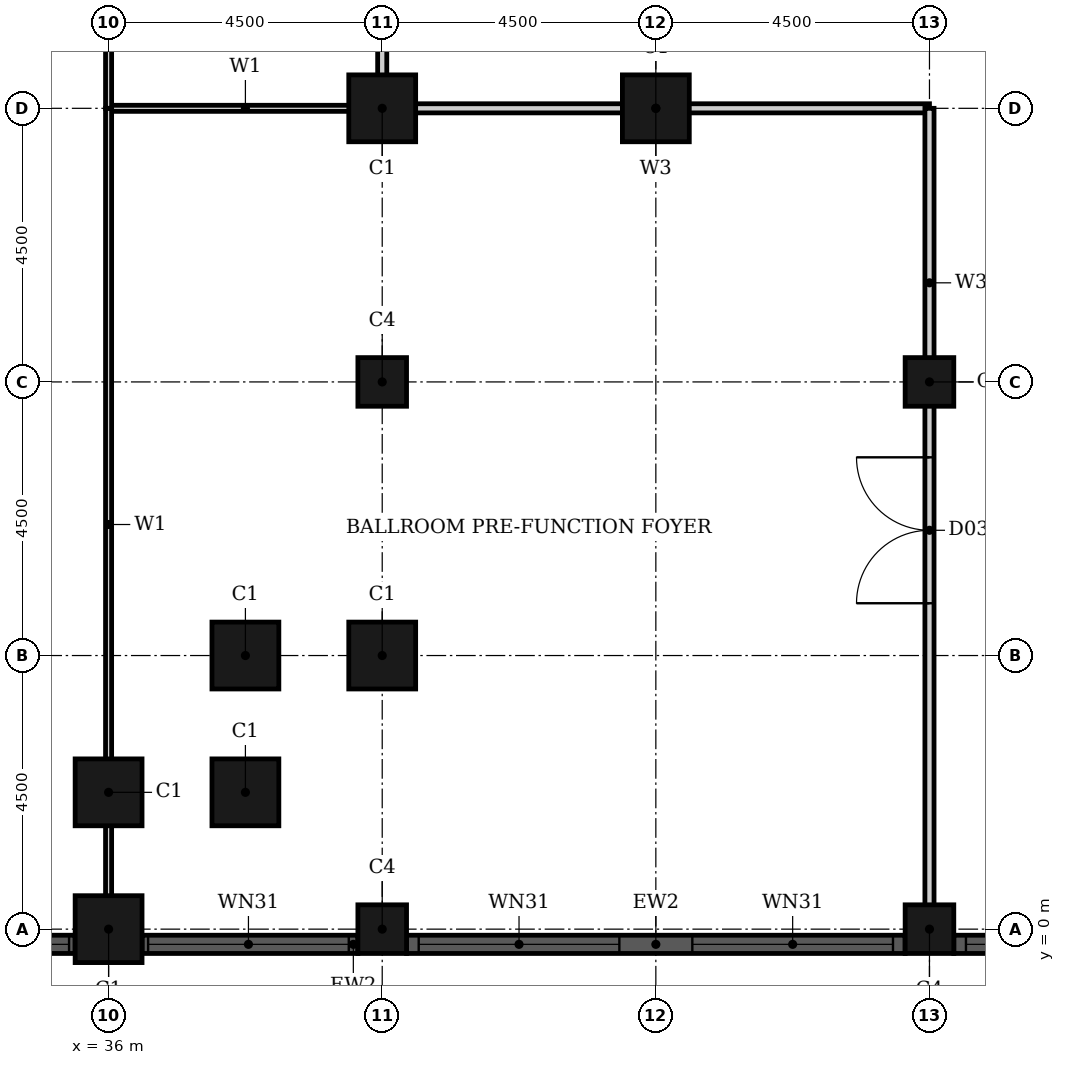
"""IFC4 building model, lengths in metres.
Left out: names, types, materials, properties, quantities, classifications, styles, units other than length and angle.
Written with IfcOpenShell. Run it as: python <this file> out.ifc"""

import sys

from ifc_helpers import new_model, si_unit, direction, frame, frame_2d, origin, origin_2d, place, context, subcontext, project, spatial, rectangle, hollow_rectangle, extrude, element, fill, save


model = new_model("IFC4")
c1 = context("Model", 3, precision=1e-05, world=origin(), true_north=direction((0.0, 1.0)))
c2 = subcontext(c1, "Body", "Model", "MODEL_VIEW")
j1 = project(units=[si_unit("LENGTHUNIT", "METRE"), si_unit("PLANEANGLEUNIT", "RADIAN")], contexts=[c1])
p1 = place(None, origin())
s1 = spatial("IfcSite", under=j1, at=p1, CompositionType="ELEMENT")
p2 = place(p1, origin())
s2 = spatial("IfcBuilding", under=s1, at=p2, CompositionType="ELEMENT")
p3 = place(p2, frame((0.0, 0.0, 17.4)))
s3 = spatial("IfcBuildingStorey", under=s2, at=p3, CompositionType="ELEMENT", Elevation=17.4)
for number, where, z_axis, x_axis in (
    (1, (36.0, 0.0, 0.0), (0.0, 0.0, 1.0), (1.0, 0.0, 0.0)),
    (2, (36.0, 2.25, 0.0), (0.0, 0.0, 1.0), (1.0, 0.0, 0.0)),
    (3, (38.25, 2.25, 0.0), (0.0, 0.0, 1.0), (1.0, 0.0, 0.0)),
    (4, (38.25, 4.5, 0.0), (0.0, 0.0, 1.0), (1.0, 0.0, 0.0)),
    (5, (40.5, 4.5, 0.0), (0.0, 0.0, 1.0), (1.0, 0.0, 0.0)),
    (6, (40.5, 13.5, 0.0), (0.0, 0.0, 1.0), (1.0, 0.0, 0.0)),
    (7, (45.0, 13.5, 0.0), (0.0, 0.0, 1.0), (1.0, 0.0, 0.0)),
):
    element("IfcColumn", number, at=place(p3, frame(where, z_axis=z_axis, x_axis=x_axis)), inside=s3, PredefinedType="COLUMN", context=c2, shape_type="SweptSolid", body=[
        extrude(hollow_rectangle(XDim=1.1, YDim=1.1, WallThickness=0.036, at=origin_2d()), origin(), (0.0, 0.0, 1.0), 6.6),
    ])
for number, where, z_axis, x_axis in (
    (8, (40.5, 0.0, 0.0), (0.0, 0.0, 1.0), (1.0, 0.0, 0.0)),
    (9, (49.5, 0.0, 0.0), (0.0, 0.0, 1.0), (1.0, 0.0, 0.0)),
    (10, (40.5, 9.0, 0.0), (0.0, 0.0, 1.0), (1.0, 0.0, 0.0)),
    (11, (49.5, 9.0, 0.0), (0.0, 0.0, 1.0), (1.0, 0.0, 0.0)),
):
    element("IfcColumn", number, at=place(p3, frame(where, z_axis=z_axis, x_axis=x_axis)), inside=s3, PredefinedType="COLUMN", context=c2, shape_type="SweptSolid", body=[
        extrude(hollow_rectangle(XDim=0.8, YDim=0.8, WallThickness=0.025, at=origin_2d()), origin(), (0.0, 0.0, 1.0), 6.6),
    ])
p4 = place(p3, frame((31.9, -0.25, 0.0), z_axis=(0.0, 0.0, 1.0), x_axis=(1.0, 0.0, 0.0)))
e12 = element("IfcWall", 12, at=p4, inside=s3, PredefinedType="SOLIDWALL", context=c2, shape_type="SweptSolid", body=[
    extrude(rectangle(XDim=3.55, YDim=0.3, at=frame_2d((1.775, 0.0))), origin(), (0.0, 0.0, 1.0), 6.6),
])
p5 = place(p4, frame((0.15, 0.0, 0.9)))
e13 = element("IfcOpeningElement", 13, at=p5, cuts=e12, PredefinedType="OPENING", context=c2, shape_type="SweptSolid", body=[
    extrude(rectangle(XDim=3.3, YDim=3.6, at=frame_2d((1.65, 1.8))), frame((0.0, 0.16, 0.0), z_axis=(0.0, -1.0, 0.0), x_axis=(1.0, 0.0, 0.0)), (0.0, 0.0, 1.0), 0.32),
])
p6 = place(p3, frame((36.55, -0.25, 0.0), z_axis=(0.0, 0.0, 1.0), x_axis=(1.0, 0.0, 0.0)))
e14 = element("IfcWall", 14, at=p6, inside=s3, PredefinedType="SOLIDWALL", context=c2, shape_type="SweptSolid", body=[
    extrude(rectangle(XDim=3.55, YDim=0.3, at=frame_2d((1.775, 0.0))), origin(), (0.0, 0.0, 1.0), 6.6),
])
p7 = place(p6, frame((0.1, 0.0, 0.9)))
e15 = element("IfcOpeningElement", 15, at=p7, cuts=e14, PredefinedType="OPENING", context=c2, shape_type="SweptSolid", body=[
    extrude(rectangle(XDim=3.3, YDim=3.6, at=frame_2d((1.65, 1.8))), frame((0.0, 0.16, 0.0), z_axis=(0.0, -1.0, 0.0), x_axis=(1.0, 0.0, 0.0)), (0.0, 0.0, 1.0), 0.32),
])
p8 = place(p3, frame((40.9, -0.25, 0.0), z_axis=(0.0, 0.0, 1.0), x_axis=(1.0, 0.0, 0.0)))
e16 = element("IfcWall", 16, at=p8, inside=s3, PredefinedType="SOLIDWALL", context=c2, shape_type="SweptSolid", body=[
    extrude(rectangle(XDim=8.2, YDim=0.3, at=frame_2d((4.1, 0.0))), origin(), (0.0, 0.0, 1.0), 6.6),
])
p9 = place(p8, frame((0.2, 0.0, 0.9)))
e17 = element("IfcOpeningElement", 17, at=p9, cuts=e16, PredefinedType="OPENING", context=c2, shape_type="SweptSolid", body=[
    extrude(rectangle(XDim=3.3, YDim=3.6, at=frame_2d((1.65, 1.8))), frame((0.0, 0.16, 0.0), z_axis=(0.0, -1.0, 0.0), x_axis=(1.0, 0.0, 0.0)), (0.0, 0.0, 1.0), 0.32),
])
p10 = place(p8, frame((4.7, 0.0, 0.9)))
e18 = element("IfcOpeningElement", 18, at=p10, cuts=e16, PredefinedType="OPENING", context=c2, shape_type="SweptSolid", body=[
    extrude(rectangle(XDim=3.3, YDim=3.6, at=frame_2d((1.65, 1.8))), frame((0.0, 0.16, 0.0), z_axis=(0.0, -1.0, 0.0), x_axis=(1.0, 0.0, 0.0)), (0.0, 0.0, 1.0), 0.32),
])
p11 = place(p3, frame((49.9, -0.25, 0.0), z_axis=(0.0, 0.0, 1.0), x_axis=(1.0, 0.0, 0.0)))
e19 = element("IfcWall", 19, at=p11, inside=s3, PredefinedType="SOLIDWALL", context=c2, shape_type="SweptSolid", body=[
    extrude(rectangle(XDim=8.2, YDim=0.3, at=frame_2d((4.1, 0.0))), origin(), (0.0, 0.0, 1.0), 6.6),
])
p12 = place(p11, frame((0.2, 0.0, 0.9)))
e20 = element("IfcOpeningElement", 20, at=p12, cuts=e19, PredefinedType="OPENING", context=c2, shape_type="SweptSolid", body=[
    extrude(rectangle(XDim=3.3, YDim=3.6, at=frame_2d((1.65, 1.8))), frame((0.0, 0.16, 0.0), z_axis=(0.0, -1.0, 0.0), x_axis=(1.0, 0.0, 0.0)), (0.0, 0.0, 1.0), 0.32),
])
p13 = place(p11, frame((4.7, 0.0, 0.9)))
e21 = element("IfcOpeningElement", 21, at=p13, cuts=e19, PredefinedType="OPENING", context=c2, shape_type="SweptSolid", body=[
    extrude(rectangle(XDim=3.3, YDim=3.6, at=frame_2d((1.65, 1.8))), frame((0.0, 0.16, 0.0), z_axis=(0.0, -1.0, 0.0), x_axis=(1.0, 0.0, 0.0)), (0.0, 0.0, 1.0), 0.32),
])
p14 = place(p3, frame((40.5, 13.5, 0.0), z_axis=(0.0, 0.0, 1.0), x_axis=(1.0, 0.0, 0.0)))
e22 = element("IfcWall", 22, at=p14, inside=s3, PredefinedType="PARTITIONING", context=c2, shape_type="SweptSolid", body=[
    extrude(rectangle(XDim=9.0, YDim=0.15, at=frame_2d((4.5, 0.0))), origin(), (0.0, 0.0, 1.0), 6.25),
])
p15 = place(p3, frame((40.5, 13.5, 0.0), z_axis=(0.0, 0.0, 1.0), x_axis=(0.0, 1.0, 0.0)))
e23 = element("IfcWall", 23, at=p15, inside=s3, PredefinedType="PARTITIONING", context=c2, shape_type="SweptSolid", body=[
    extrude(rectangle(XDim=9.0, YDim=0.15, at=frame_2d((4.5, 0.0))), origin(), (0.0, 0.0, 1.0), 6.25),
])
p16 = place(p15, frame((5.35, 0.0, 0.0)))
e24 = element("IfcOpeningElement", 24, at=p16, cuts=e23, PredefinedType="OPENING", context=c2, shape_type="SweptSolid", body=[
    extrude(rectangle(XDim=1.0, YDim=2.1, at=frame_2d((0.5, 1.05))), frame((0.0, 0.085, 0.0), z_axis=(0.0, -1.0, 0.0), x_axis=(1.0, 0.0, 0.0)), (0.0, 0.0, 1.0), 0.17),
])
p17 = place(p3, frame((49.5, -0.19, 0.0), z_axis=(0.0, 0.0, 1.0), x_axis=(0.0, 1.0, 0.0)))
e25 = element("IfcWall", 25, at=p17, inside=s3, PredefinedType="PARTITIONING", context=c2, shape_type="SweptSolid", body=[
    extrude(rectangle(XDim=13.69, YDim=0.15, at=frame_2d((6.845, 0.0))), origin(), (0.0, 0.0, 1.0), 6.25),
])
p18 = place(p17, frame((5.55, 0.0, 0.0)))
e26 = element("IfcOpeningElement", 26, at=p18, cuts=e25, PredefinedType="OPENING", context=c2, shape_type="SweptSolid", body=[
    extrude(rectangle(XDim=2.4, YDim=2.4, at=frame_2d((1.2, 1.2))), frame((0.0, 0.085, 0.0), z_axis=(0.0, -1.0, 0.0), x_axis=(1.0, 0.0, 0.0)), (0.0, 0.0, 1.0), 0.17),
])
p19 = place(p3, frame((36.0, 13.5, 0.0), z_axis=(0.0, 0.0, 1.0), x_axis=(1.0, 0.0, 0.0)))
e27 = element("IfcWall", 27, at=p19, inside=s3, PredefinedType="PARTITIONING", context=c2, shape_type="SweptSolid", body=[
    extrude(rectangle(XDim=4.5, YDim=0.1, at=frame_2d((2.25, 0.0))), origin(), (0.0, 0.0, 1.0), 6.25),
])
p20 = place(p3, frame((36.0, -0.19, 0.0), z_axis=(0.0, 0.0, 1.0), x_axis=(0.0, 1.0, 0.0)))
e28 = element("IfcWall", 28, at=p20, inside=s3, PredefinedType="PARTITIONING", context=c2, shape_type="SweptSolid", body=[
    extrude(rectangle(XDim=13.69, YDim=0.1, at=frame_2d((6.845, 0.0))), origin(), (0.0, 0.0, 1.0), 6.25),
])
p21 = place(p3, frame((36.0, 13.5, 0.0), z_axis=(0.0, 0.0, 1.0), x_axis=(0.0, 1.0, 0.0)))
e29 = element("IfcWall", 29, at=p21, inside=s3, PredefinedType="PARTITIONING", context=c2, shape_type="SweptSolid", body=[
    extrude(rectangle(XDim=4.5, YDim=0.1, at=frame_2d((2.25, 0.0))), origin(), (0.0, 0.0, 1.0), 6.25),
])
p22 = place(p5, origin())
e30 = element("IfcWindow", 30, at=p22, inside=s3, PartitioningType="SINGLE_PANEL", PredefinedType="WINDOW", context=c2, shape_type="SweptSolid", body=[
    extrude(rectangle(XDim=3.3, YDim=3.6, at=frame_2d((1.65, 1.8))), frame((0.0, 0.03, 0.0), z_axis=(0.0, -1.0, 0.0), x_axis=(1.0, 0.0, 0.0)), (0.0, 0.0, 1.0), 0.06),
])
fill(e13, e30)
p23 = place(p7, origin())
e31 = element("IfcWindow", 31, at=p23, inside=s3, PartitioningType="SINGLE_PANEL", PredefinedType="WINDOW", context=c2, shape_type="SweptSolid", body=[
    extrude(rectangle(XDim=3.3, YDim=3.6, at=frame_2d((1.65, 1.8))), frame((0.0, 0.03, 0.0), z_axis=(0.0, -1.0, 0.0), x_axis=(1.0, 0.0, 0.0)), (0.0, 0.0, 1.0), 0.06),
])
fill(e15, e31)
p24 = place(p9, origin())
e32 = element("IfcWindow", 32, at=p24, inside=s3, PartitioningType="SINGLE_PANEL", PredefinedType="WINDOW", context=c2, shape_type="SweptSolid", body=[
    extrude(rectangle(XDim=3.3, YDim=3.6, at=frame_2d((1.65, 1.8))), frame((0.0, 0.03, 0.0), z_axis=(0.0, -1.0, 0.0), x_axis=(1.0, 0.0, 0.0)), (0.0, 0.0, 1.0), 0.06),
])
fill(e17, e32)
p25 = place(p10, origin())
e33 = element("IfcWindow", 33, at=p25, inside=s3, PartitioningType="SINGLE_PANEL", PredefinedType="WINDOW", context=c2, shape_type="SweptSolid", body=[
    extrude(rectangle(XDim=3.3, YDim=3.6, at=frame_2d((1.65, 1.8))), frame((0.0, 0.03, 0.0), z_axis=(0.0, -1.0, 0.0), x_axis=(1.0, 0.0, 0.0)), (0.0, 0.0, 1.0), 0.06),
])
fill(e18, e33)
p26 = place(p12, origin())
e34 = element("IfcWindow", 34, at=p26, inside=s3, PartitioningType="SINGLE_PANEL", PredefinedType="WINDOW", context=c2, shape_type="SweptSolid", body=[
    extrude(rectangle(XDim=3.3, YDim=3.6, at=frame_2d((1.65, 1.8))), frame((0.0, 0.03, 0.0), z_axis=(0.0, -1.0, 0.0), x_axis=(1.0, 0.0, 0.0)), (0.0, 0.0, 1.0), 0.06),
])
fill(e20, e34)
p27 = place(p18, origin())
e35 = element("IfcDoor", 35, at=p27, inside=s3, OperationType="DOUBLE_DOOR_SINGLE_SWING", PredefinedType="DOOR", context=c2, shape_type="SweptSolid", body=[
    extrude(rectangle(XDim=2.4, YDim=2.4, at=frame_2d((1.2, 1.2))), frame((0.0, 0.025, 0.0), z_axis=(0.0, -1.0, 0.0), x_axis=(1.0, 0.0, 0.0)), (0.0, 0.0, 1.0), 0.05),
])
fill(e26, e35)
save(model, sys.argv[1])
